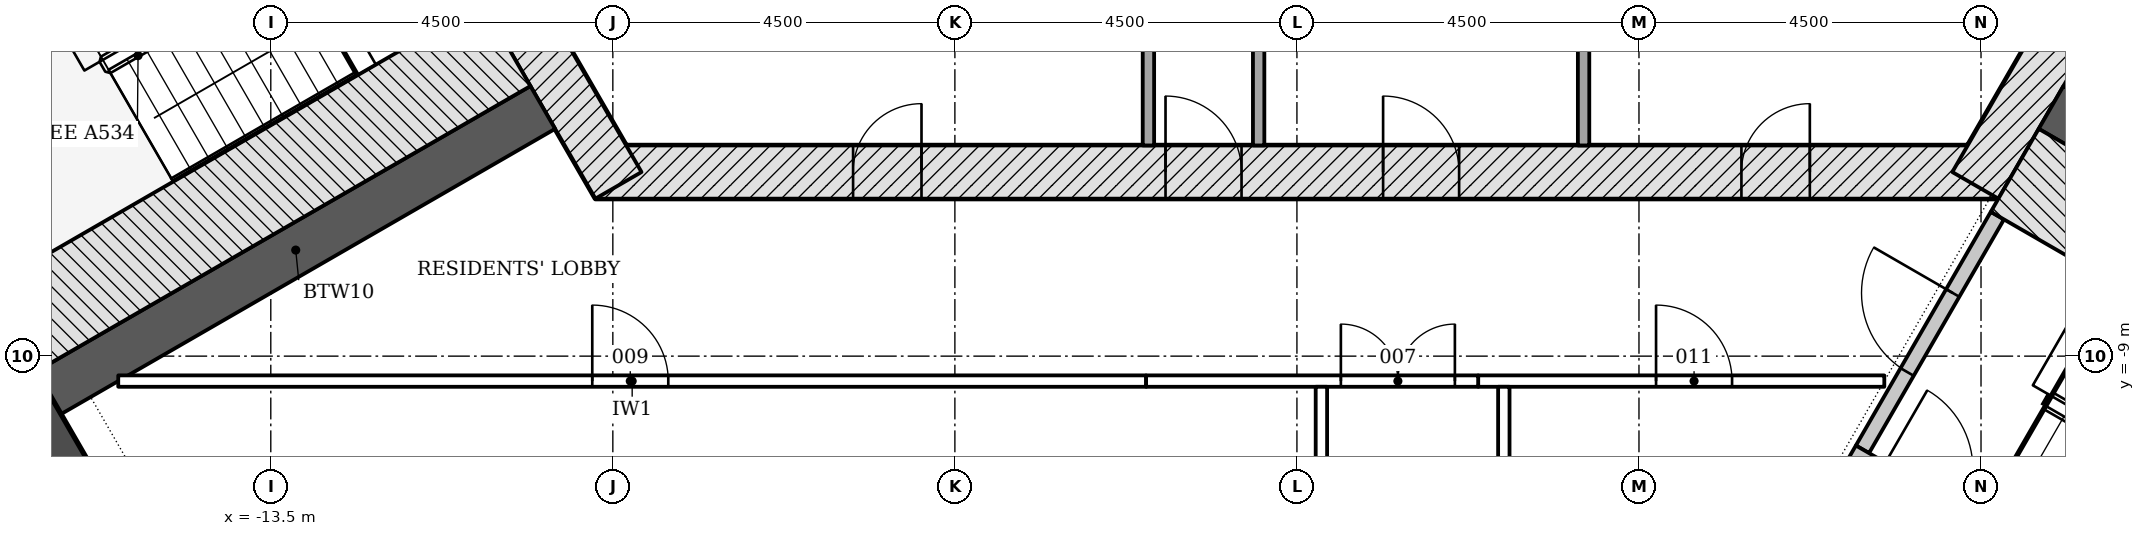
"""IFC4 building model, lengths in metres.
Left out: names, types, materials, properties, quantities, classifications, styles, units other than length and angle.
Written with IfcOpenShell. Run it as: python <this file> out.ifc"""

import sys

from ifc_helpers import new_model, si_unit, direction, frame, frame_2d, origin, origin_2d, place, context, subcontext, project, spatial, polyline, rectangle, outline, extrude, element, fill, save


model = new_model("IFC4")
c1 = context("Model", 3, precision=1e-05, world=origin(), true_north=direction((0.0, 1.0)))
c2 = subcontext(c1, "Body", "Model", "MODEL_VIEW")
j1 = project(units=[si_unit("LENGTHUNIT", "METRE"), si_unit("PLANEANGLEUNIT", "RADIAN")], contexts=[c1])
p1 = place(None, origin())
s1 = spatial("IfcSite", under=j1, at=p1, CompositionType="ELEMENT")
p2 = place(p1, origin())
s2 = spatial("IfcBuilding", under=s1, at=p2, CompositionType="ELEMENT")
p3 = place(p2, frame((0.0, 0.0, 229.2)))
s3 = spatial("IfcBuildingStorey", under=s2, at=p3, CompositionType="ELEMENT", Elevation=229.2)
p4 = place(p3, frame((-9.229, -6.578, -0.2), z_axis=(0.0, 0.0, 1.0), x_axis=(1.0, 0.0, 0.0)))
e1 = element("IfcWall", 1, at=p4, inside=s3, PredefinedType="SHEAR", context=c2, shape_type="SweptSolid", body=[
    extrude(rectangle(XDim=18.458, YDim=0.7, at=frame_2d((9.229, 0.0))), origin(), (0.0, 0.0, 1.0), 3.6),
])
p5 = place(p4, frame((7.5, 0.0, 0.2)))
e2 = element("IfcOpeningElement", 2, at=p5, cuts=e1, PredefinedType="OPENING", context=c2, shape_type="SweptSolid", body=[
    extrude(rectangle(XDim=1.0, YDim=2.1, at=frame_2d((0.5, 1.05))), frame((0.0, 0.36, 0.0), z_axis=(0.0, -1.0, 0.0), x_axis=(1.0, 0.0, 0.0)), (0.0, 0.0, 1.0), 0.72),
])
p6 = place(p4, frame((3.389, 0.0, 0.2)))
e3 = element("IfcOpeningElement", 3, at=p6, cuts=e1, PredefinedType="OPENING", context=c2, shape_type="SweptSolid", body=[
    extrude(rectangle(XDim=0.9, YDim=2.1, at=frame_2d((0.45, 1.05))), frame((0.0, 0.36, 0.0), z_axis=(0.0, -1.0, 0.0), x_axis=(1.0, 0.0, 0.0)), (0.0, 0.0, 1.0), 0.72),
])
p7 = place(p4, frame((10.363, 0.0, 0.2)))
e4 = element("IfcOpeningElement", 4, at=p7, cuts=e1, PredefinedType="OPENING", context=c2, shape_type="SweptSolid", body=[
    extrude(rectangle(XDim=1.0, YDim=2.1, at=frame_2d((0.5, 1.05))), frame((0.0, 0.36, 0.0), z_axis=(0.0, -1.0, 0.0), x_axis=(1.0, 0.0, 0.0)), (0.0, 0.0, 1.0), 0.72),
])
p8 = place(p4, frame((15.077, 0.0, 0.2)))
e5 = element("IfcOpeningElement", 5, at=p8, cuts=e1, PredefinedType="OPENING", context=c2, shape_type="SweptSolid", body=[
    extrude(rectangle(XDim=0.9, YDim=2.1, at=frame_2d((0.45, 1.05))), frame((0.0, 0.36, 0.0), z_axis=(0.0, -1.0, 0.0), x_axis=(1.0, 0.0, 0.0)), (0.0, 0.0, 1.0), 0.72),
])
for number, where, z_axis, x_axis in (
    (6, (8.926, -6.753, -0.2), (0.0, 0.0, 1.0), (0.5, 0.866, 0.0)),
    (7, (-10.311, -4.353, -0.2), (0.0, 0.0, 1.0), (0.5, -0.866, 0.0)),
):
    element("IfcWall", number, at=place(p3, frame(where, z_axis=z_axis, x_axis=x_axis)), inside=s3, PredefinedType="SHEAR", context=c2, shape_type="SweptSolid", body=[
        extrude(rectangle(XDim=2.771, YDim=0.7, at=frame_2d((1.386, 0.0))), origin(), (0.0, 0.0, 1.0), 3.6),
    ])
for number, where, z_axis, x_axis in (
    (8, (-9.922, -5.728, -0.2), (0.0, 0.0, 1.0), (-0.866, -0.5, 0.0)),
    (9, (9.922, -5.728, -0.2), (0.0, 0.0, 1.0), (0.866, -0.5, 0.0)),
):
    element("IfcWall", number, at=place(p3, frame(where, z_axis=z_axis, x_axis=x_axis)), inside=s3, PredefinedType="SHEAR", context=c2, shape_type="SweptSolid", body=[
        extrude(rectangle(XDim=7.506, YDim=0.65, at=frame_2d((3.753, 0.0))), origin(), (0.0, 0.0, 1.0), 3.6),
    ])
p9 = place(p3, frame((-17.505, -10.106, -0.2), z_axis=(0.0, 0.0, 1.0), x_axis=(-0.866025403784, -0.5, 0.0)))
e10 = element("IfcColumn", 10, at=p9, inside=s3, PredefinedType="COLUMN", context=c2, shape_type="SweptSolid", body=[
    extrude(rectangle(XDim=2.5, YDim=2.5, at=origin_2d()), origin(), (0.0, 0.0, 1.0), 3.6),
])
p10 = place(p3, origin())
e11 = element("IfcWall", 11, at=p10, inside=s3, PredefinedType="NOTDEFINED", context=c2, shape_type="SweptSolid", body=[
    extrude(outline(polyline([(-18.457, -2.328), (-19.842, -5.13), (-20.323, -6.478), (-20.504, -7.898), (-20.375, -9.323), (-19.942, -10.687), (-19.227, -11.927), (-18.261, -12.983), (-17.092, -13.808), (-15.772, -14.361), (-14.364, -14.619), (-11.244, -14.82), (-11.225, -14.521), (-14.327, -14.32), (-15.686, -14.072), (-16.945, -13.544), (-18.062, -12.757), (-18.983, -11.748), (-19.666, -10.566), (-20.079, -9.264), (-20.202, -7.903), (-20.03, -6.548), (-19.565, -5.248), (-18.188, -2.46), (-18.457, -2.328)])), origin(), (0.0, 0.0, 1.0), 3.3),
])
p11 = place(p3, frame((-1.954, 8.942, 0.0), z_axis=(0.0, 0.0, 1.0), x_axis=(0.0, -1.0, 0.0)))
e12 = element("IfcWall", 12, at=p11, inside=s3, PredefinedType="PARTITIONING", context=c2, shape_type="SweptSolid", body=[
    extrude(rectangle(XDim=15.171, YDim=0.15, at=frame_2d((7.585, 0.0))), origin(), (0.0, 0.0, 1.0), 3.4),
])
p12 = place(p11, frame((7.121, 0.0, 0.0)))
e13 = element("IfcOpeningElement", 13, at=p12, cuts=e12, PredefinedType="OPENING", context=c2, shape_type="SweptSolid", body=[
    extrude(rectangle(XDim=0.9, YDim=2.1, at=frame_2d((0.45, 1.05))), frame((0.0, 0.085, 0.0), z_axis=(0.0, -1.0, 0.0), x_axis=(1.0, 0.0, 0.0)), (0.0, 0.0, 1.0), 0.17),
])
p13 = place(p3, frame((-0.504, 5.897, 0.0), z_axis=(0.0, 0.0, 1.0), x_axis=(0.0, -1.0, 0.0)))
e14 = element("IfcWall", 14, at=p13, inside=s3, PredefinedType="PARTITIONING", context=c2, shape_type="SweptSolid", body=[
    extrude(rectangle(XDim=12.125, YDim=0.15, at=frame_2d((6.062, 0.0))), origin(), (0.0, 0.0, 1.0), 3.4),
])
p14 = place(p13, frame((4.114, 0.0, 0.0)))
e15 = element("IfcOpeningElement", 15, at=p14, cuts=e14, PredefinedType="OPENING", context=c2, shape_type="SweptSolid", body=[
    extrude(rectangle(XDim=0.9, YDim=2.1, at=frame_2d((0.45, 1.05))), frame((0.0, 0.085, 0.0), z_axis=(0.0, -1.0, 0.0), x_axis=(1.0, 0.0, 0.0)), (0.0, 0.0, 1.0), 0.17),
])
p15 = place(p3, frame((3.771, -3.303, 0.0), z_axis=(0.0, 0.0, 1.0), x_axis=(0.0, -1.0, 0.0)))
e16 = element("IfcWall", 16, at=p15, inside=s3, PredefinedType="PARTITIONING", context=c2, shape_type="SweptSolid", body=[
    extrude(rectangle(XDim=2.925, YDim=0.15, at=frame_2d((1.462, 0.0))), origin(), (0.0, 0.0, 1.0), 3.4),
])
p16 = place(p3, frame((-10.399, -4.901, -0.2), z_axis=(0.0, 0.0, 1.0), x_axis=(-0.866020939036, -0.500007733091, 0.0)))
e17 = element("IfcWall", 17, at=p16, inside=s3, PredefinedType="SHEAR", context=c2, shape_type="SweptSolid", body=[
    extrude(rectangle(XDim=7.507, YDim=1.261, at=frame_2d((3.753, 0.0))), origin(), (0.0, 0.0, 1.0), 3.6),
])
p17 = place(p3, frame((7.44, -10.226, -0.2), z_axis=(0.0, 0.0, 1.0), x_axis=(0.500022077904, 0.866012656725, 0.0)))
e18 = element("IfcWall", 18, at=p17, inside=s3, PredefinedType="SHEAR", context=c2, shape_type="SweptSolid", body=[
    extrude(rectangle(XDim=3.55, YDim=0.2, at=frame_2d((1.775, 0.0))), origin(), (0.0, 0.0, 1.0), 3.6),
])
p18 = place(p17, frame((1.175, 0.0, 0.2)))
e19 = element("IfcOpeningElement", 19, at=p18, cuts=e18, PredefinedType="OPENING", context=c2, shape_type="SweptSolid", body=[
    extrude(rectangle(XDim=1.2, YDim=2.1, at=frame_2d((0.6, 1.05))), frame((0.0, 0.11, 0.0), z_axis=(0.0, -1.0, 0.0), x_axis=(1.0, 0.0, 0.0)), (0.0, 0.0, 1.0), 0.22),
])
p19 = place(p3, frame((7.304, -10.262, -0.2), z_axis=(0.0, 0.0, 1.0), x_axis=(0.866026594901, -0.49999793692, 0.0)))
e20 = element("IfcWall", 20, at=p19, inside=s3, PredefinedType="SHEAR", context=c2, shape_type="SweptSolid", body=[
    extrude(rectangle(XDim=5.6, YDim=0.2, at=frame_2d((2.8, 0.0))), origin(), (0.0, 0.0, 1.0), 3.6),
])
p20 = place(p19, frame((0.45, 0.0, 0.2)))
e21 = element("IfcOpeningElement", 21, at=p20, cuts=e20, PredefinedType="OPENING", context=c2, shape_type="SweptSolid", body=[
    extrude(rectangle(XDim=1.2, YDim=2.1, at=frame_2d((0.6, 1.05))), frame((0.0, 0.11, 0.0), z_axis=(0.0, -1.0, 0.0), x_axis=(1.0, 0.0, 0.0)), (0.0, 0.0, 1.0), 0.22),
])
p21 = place(p3, frame((9.444, -6.555, -0.2), z_axis=(0.0, 0.0, 1.0), x_axis=(0.866020939036, -0.500007733091, 0.0)))
e22 = element("IfcWall", 22, at=p21, inside=s3, PredefinedType="SHEAR", context=c2, shape_type="SweptSolid", body=[
    extrude(rectangle(XDim=7.507, YDim=1.261, at=frame_2d((3.753, 0.0))), origin(), (0.0, 0.0, 1.0), 3.6),
])
p22 = place(p3, frame((15.832, -8.765, 0.0), z_axis=(0.0, 0.0, 1.0), x_axis=(-0.500008967739, 0.866020226196, 0.0)))
e23 = element("IfcWall", 23, at=p22, inside=s3, PredefinedType="PARTITIONING", context=c2, shape_type="SweptSolid", body=[
    extrude(rectangle(XDim=13.523, YDim=0.15, at=frame_2d((6.761, 0.0))), origin(), (0.0, 0.0, 1.0), 2.852),
])
p23 = place(p3, frame((-15.507, -9.328, 0.0), z_axis=(0.0, 0.0, 1.0), x_axis=(1.0, 0.0, 0.0)))
e24 = element("IfcWall", 24, at=p23, inside=s3, PredefinedType="PARTITIONING", context=c2, shape_type="SweptSolid", body=[
    extrude(rectangle(XDim=13.522, YDim=0.15, at=frame_2d((6.761, 0.0))), origin(), (0.0, 0.0, 1.0), 2.852),
])
p24 = place(p23, frame((6.236, 0.0, 0.0)))
e25 = element("IfcOpeningElement", 25, at=p24, cuts=e24, PredefinedType="OPENING", context=c2, shape_type="SweptSolid", body=[
    extrude(rectangle(XDim=1.0, YDim=2.1, at=frame_2d((0.5, 1.05))), frame((0.0, 0.085, 0.0), z_axis=(0.0, -1.0, 0.0), x_axis=(1.0, 0.0, 0.0)), (0.0, 0.0, 1.0), 0.17),
])
p25 = place(p3, frame((2.384, -9.328, 0.0), z_axis=(0.0, 0.0, 1.0), x_axis=(1.0, 0.0, 0.0)))
e26 = element("IfcWall", 26, at=p25, inside=s3, PredefinedType="PARTITIONING", context=c2, shape_type="SweptSolid", body=[
    extrude(rectangle(XDim=5.343, YDim=0.15, at=frame_2d((2.672, 0.0))), origin(), (0.0, 0.0, 1.0), 2.852),
])
p26 = place(p25, frame((2.341, 0.0, 0.0)))
e27 = element("IfcOpeningElement", 27, at=p26, cuts=e26, PredefinedType="OPENING", context=c2, shape_type="SweptSolid", body=[
    extrude(rectangle(XDim=1.0, YDim=2.1, at=frame_2d((0.5, 1.05))), frame((0.0, 0.085, 0.0), z_axis=(0.0, -1.0, 0.0), x_axis=(1.0, 0.0, 0.0)), (0.0, 0.0, 1.0), 0.17),
])
p27 = place(p3, frame((-1.984, -9.328, 0.0), z_axis=(0.0, 0.0, 1.0), x_axis=(1.0, 0.0, 0.0)))
e28 = element("IfcWall", 28, at=p27, inside=s3, PredefinedType="PARTITIONING", context=c2, shape_type="SweptSolid", body=[
    extrude(rectangle(XDim=4.369, YDim=0.15, at=frame_2d((2.184, 0.0))), origin(), (0.0, 0.0, 1.0), 2.852),
])
p28 = place(p27, frame((2.562, 0.0, 0.0)))
e29 = element("IfcOpeningElement", 29, at=p28, cuts=e28, PredefinedType="OPENING", context=c2, shape_type="SweptSolid", body=[
    extrude(rectangle(XDim=1.5, YDim=2.1, at=frame_2d((0.75, 1.05))), frame((0.0, 0.085, 0.0), z_axis=(0.0, -1.0, 0.0), x_axis=(1.0, 0.0, 0.0)), (0.0, 0.0, 1.0), 0.17),
])
for number, where, z_axis, x_axis in (
    (30, (0.322, -9.403, 0.0), (0.0, 0.0, 1.0), (0.0, -1.0, 0.0)),
    (31, (2.722, -9.403, 0.0), (0.0, 0.0, 1.0), (0.0, -1.0, 0.0)),
):
    element("IfcWall", number, at=place(p3, frame(where, z_axis=z_axis, x_axis=x_axis)), inside=s3, PredefinedType="PARTITIONING", context=c2, shape_type="SweptSolid", body=[
        extrude(rectangle(XDim=3.114, YDim=0.15, at=frame_2d((1.557, 0.0))), origin(), (0.0, 0.0, 1.0), 3.4),
    ])
p29 = place(p5, origin())
e32 = element("IfcDoor", 32, at=p29, inside=s3, OperationType="SINGLE_SWING_LEFT", PredefinedType="DOOR", context=c2, shape_type="SweptSolid", body=[
    extrude(rectangle(XDim=1.0, YDim=2.1, at=frame_2d((0.5, 1.05))), frame((0.0, 0.075, 0.0), z_axis=(0.0, -1.0, 0.0), x_axis=(1.0, 0.0, 0.0)), (0.0, 0.0, 1.0), 0.15),
])
fill(e2, e32)
p30 = place(p6, origin())
e33 = element("IfcDoor", 33, at=p30, inside=s3, OperationType="SINGLE_SWING_RIGHT", PredefinedType="DOOR", context=c2, shape_type="SweptSolid", body=[
    extrude(rectangle(XDim=0.9, YDim=2.1, at=frame_2d((0.45, 1.05))), frame((0.0, 0.075, 0.0), z_axis=(0.0, -1.0, 0.0), x_axis=(1.0, 0.0, 0.0)), (0.0, 0.0, 1.0), 0.15),
])
fill(e3, e33)
p31 = place(p7, origin())
e34 = element("IfcDoor", 34, at=p31, inside=s3, OperationType="SINGLE_SWING_LEFT", PredefinedType="DOOR", context=c2, shape_type="SweptSolid", body=[
    extrude(rectangle(XDim=1.0, YDim=2.1, at=frame_2d((0.5, 1.05))), frame((0.0, 0.075, 0.0), z_axis=(0.0, -1.0, 0.0), x_axis=(1.0, 0.0, 0.0)), (0.0, 0.0, 1.0), 0.15),
])
fill(e4, e34)
p32 = place(p8, origin())
e35 = element("IfcDoor", 35, at=p32, inside=s3, OperationType="SINGLE_SWING_RIGHT", PredefinedType="DOOR", context=c2, shape_type="SweptSolid", body=[
    extrude(rectangle(XDim=0.9, YDim=2.1, at=frame_2d((0.45, 1.05))), frame((0.0, 0.075, 0.0), z_axis=(0.0, -1.0, 0.0), x_axis=(1.0, 0.0, 0.0)), (0.0, 0.0, 1.0), 0.15),
])
fill(e5, e35)
p33 = place(p18, origin())
e36 = element("IfcDoor", 36, at=p33, inside=s3, OperationType="SINGLE_SWING_RIGHT", PredefinedType="DOOR", context=c2, shape_type="SweptSolid", body=[
    extrude(rectangle(XDim=1.2, YDim=2.1, at=frame_2d((0.6, 1.05))), frame((0.0, 0.025, 0.0), z_axis=(0.0, -1.0, 0.0), x_axis=(1.0, 0.0, 0.0)), (0.0, 0.0, 1.0), 0.05),
])
fill(e19, e36)
p34 = place(p28, origin())
e37 = element("IfcDoor", 37, at=p34, inside=s3, OperationType="DOUBLE_DOOR_SINGLE_SWING", PredefinedType="DOOR", context=c2, shape_type="SweptSolid", body=[
    extrude(rectangle(XDim=1.5, YDim=2.1, at=frame_2d((0.75, 1.05))), frame((0.0, 0.025, 0.0), z_axis=(0.0, -1.0, 0.0), x_axis=(1.0, 0.0, 0.0)), (0.0, 0.0, 1.0), 0.05),
])
fill(e29, e37)
p35 = place(p24, origin())
e38 = element("IfcDoor", 38, at=p35, inside=s3, OperationType="SINGLE_SWING_LEFT", PredefinedType="DOOR", context=c2, shape_type="SweptSolid", body=[
    extrude(rectangle(XDim=1.0, YDim=2.1, at=frame_2d((0.5, 1.05))), frame((0.0, 0.025, 0.0), z_axis=(0.0, -1.0, 0.0), x_axis=(1.0, 0.0, 0.0)), (0.0, 0.0, 1.0), 0.05),
])
fill(e25, e38)
p36 = place(p26, origin())
e39 = element("IfcDoor", 39, at=p36, inside=s3, OperationType="SINGLE_SWING_LEFT", PredefinedType="DOOR", context=c2, shape_type="SweptSolid", body=[
    extrude(rectangle(XDim=1.0, YDim=2.1, at=frame_2d((0.5, 1.05))), frame((0.0, 0.025, 0.0), z_axis=(0.0, -1.0, 0.0), x_axis=(1.0, 0.0, 0.0)), (0.0, 0.0, 1.0), 0.05),
])
fill(e27, e39)
save(model, sys.argv[1])
